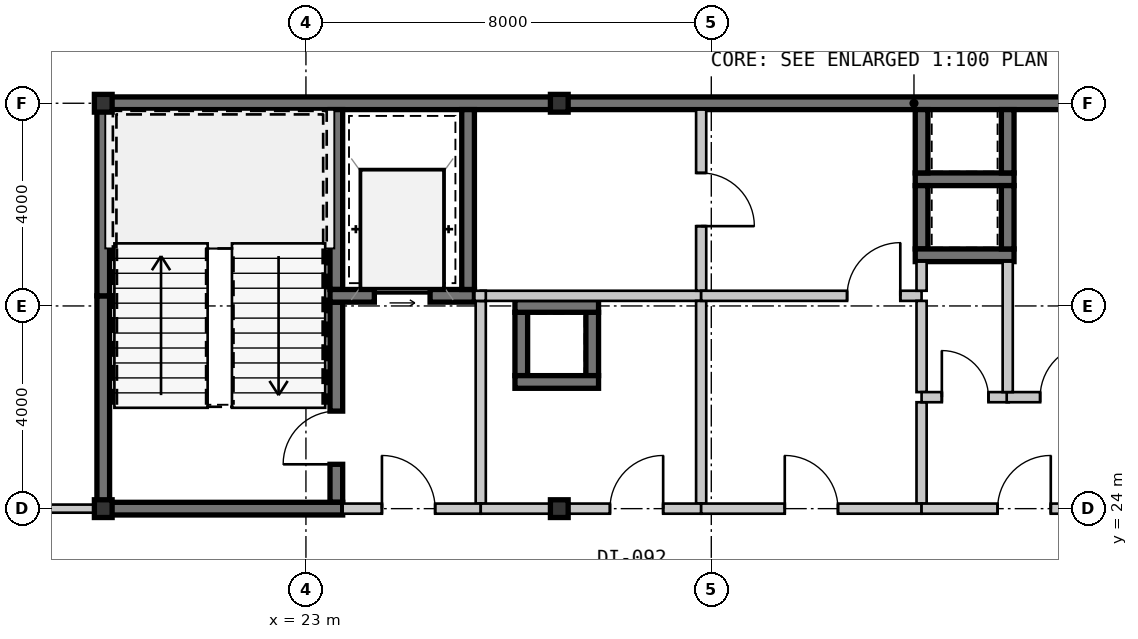
"""IFC4 building model, lengths in metres.
Left out: names, types, materials, properties, quantities, classifications, styles, units other than length and angle.
Written with IfcOpenShell. Run it as: python <this file> out.ifc"""

import sys

from ifc_helpers import new_model, si_unit, direction, frame, frame_2d, origin, origin_2d, place, context, subcontext, project, spatial, rectangle, hollow_rectangle, extrude, source, transform, mapped, element, fill, save


model = new_model("IFC4")
c1 = context("Model", 3, precision=1e-05, world=origin(), true_north=direction((0.0, 1.0)))
c2 = subcontext(c1, "Body", "Model", "MODEL_VIEW")
j1 = project(units=[si_unit("LENGTHUNIT", "METRE"), si_unit("PLANEANGLEUNIT", "RADIAN")], contexts=[c1])
p1 = place(None, origin())
s1 = spatial("IfcSite", under=j1, at=p1, CompositionType="ELEMENT")
p2 = place(p1, origin())
s2 = spatial("IfcBuilding", under=s1, at=p2, CompositionType="ELEMENT")
p3 = place(p2, frame((0.0, 0.0, 197.75)))
s3 = spatial("IfcBuildingStorey", under=s2, at=p3, CompositionType="ELEMENT", Elevation=197.75)
m1 = source(origin(), c2, "Body", "SweptSolid", [
    extrude(hollow_rectangle(XDim=0.35, YDim=0.35, WallThickness=0.016, at=origin_2d()), origin(), (0.0, 0.0, 1.0), 3.15),
])
for number, where, z_axis, x_axis in (
    (1, (19.0, 24.0, 0.0), (0.0, 0.0, 1.0), (1.0, 0.0, 0.0)),
    (2, (28.0, 24.0, 0.0), (0.0, 0.0, 1.0), (1.0, 0.0, 0.0)),
    (3, (19.0, 32.0, 0.0), (0.0, 0.0, 1.0), (1.0, 0.0, 0.0)),
    (4, (28.0, 32.0, 0.0), (0.0, 0.0, 1.0), (1.0, 0.0, 0.0)),
):
    element("IfcColumn", number, at=place(p3, frame(where, z_axis=z_axis, x_axis=x_axis)), inside=s3, PredefinedType="COLUMN", context=c2, shape_type="MappedRepresentation", body=[
        mapped(m1, transform((0.0, 0.0, 0.0), scale=1.0)),
    ])
m2 = source(origin(), c2, "Body", "SweptSolid", [
    extrude(rectangle(XDim=9.125, YDim=0.25, at=frame_2d((4.562, 0.0))), origin(), (0.0, 0.0, 1.0), 2.93),
])
p4 = place(p3, frame((18.875, 32.0, 0.0), z_axis=(0.0, 0.0, 1.0), x_axis=(1.0, 0.0, 0.0)))
e5 = element("IfcWall", 5, at=p4, inside=s3, PredefinedType="SHEAR", context=c2, shape_type="MappedRepresentation", body=[
    mapped(m2, transform((0.0, 0.0, 0.0), scale=1.0)),
])
m3 = source(origin(), c2, "Body", "SweptSolid", [
    extrude(rectangle(XDim=11.2, YDim=0.25, at=frame_2d((5.6, 0.0))), origin(), (0.0, 0.0, 1.0), 2.93),
])
p5 = place(p3, frame((28.0, 32.0, 0.0), z_axis=(0.0, 0.0, 1.0), x_axis=(1.0, 0.0, 0.0)))
e6 = element("IfcWall", 6, at=p5, inside=s3, PredefinedType="SHEAR", context=c2, shape_type="MappedRepresentation", body=[
    mapped(m3, transform((0.0, 0.0, 0.0), scale=1.0)),
])
m4 = source(origin(), c2, "Body", "SweptSolid", [
    extrude(rectangle(XDim=4.075, YDim=0.25, at=frame_2d((2.038, 0.0))), origin(), (0.0, 0.0, 1.0), 2.93),
])
p6 = place(p3, frame((19.0, 24.125, 0.0), z_axis=(0.0, 0.0, 1.0), x_axis=(0.0, 1.0, 0.0)))
e7 = element("IfcWall", 7, at=p6, inside=s3, PredefinedType="SHEAR", context=c2, shape_type="MappedRepresentation", body=[
    mapped(m4, transform((0.0, 0.0, 0.0), scale=1.0)),
])
m5 = source(origin(), c2, "Body", "SweptSolid", [
    extrude(rectangle(XDim=3.675, YDim=0.25, at=frame_2d((1.837, 0.0))), origin(), (0.0, 0.0, 1.0), 2.93),
])
p7 = place(p3, frame((19.0, 28.2, 0.0), z_axis=(0.0, 0.0, 1.0), x_axis=(0.0, 1.0, 0.0)))
e8 = element("IfcWall", 8, at=p7, inside=s3, PredefinedType="SHEAR", context=c2, shape_type="MappedRepresentation", body=[
    mapped(m5, transform((0.0, 0.0, 0.0), scale=1.0)),
])
m6 = source(origin(), c2, "Body", "SweptSolid", [
    extrude(rectangle(XDim=3.55, YDim=0.25, at=frame_2d((1.775, 0.0))), origin(), (0.0, 0.0, 1.0), 2.93),
])
p8 = place(p3, frame((23.6, 28.325, 0.0), z_axis=(0.0, 0.0, 1.0), x_axis=(0.0, 1.0, 0.0)))
e9 = element("IfcWall", 9, at=p8, inside=s3, PredefinedType="SHEAR", context=c2, shape_type="MappedRepresentation", body=[
    mapped(m6, transform((0.0, 0.0, 0.0), scale=1.0)),
])
m7 = source(origin(), c2, "Body", "SweptSolid", [
    extrude(rectangle(XDim=3.95, YDim=0.25, at=frame_2d((1.975, 0.0))), origin(), (0.0, 0.0, 1.0), 2.93),
])
p9 = place(p3, frame((23.6, 24.125, 0.0), z_axis=(0.0, 0.0, 1.0), x_axis=(0.0, 1.0, 0.0)))
e10 = element("IfcWall", 10, at=p9, inside=s3, PredefinedType="SHEAR", context=c2, shape_type="MappedRepresentation", body=[
    mapped(m7, transform((0.0, 0.0, 0.0), scale=1.0)),
])
m8 = source(origin(), c2, "Body", "SweptSolid", [
    extrude(rectangle(XDim=1.05, YDim=2.1, at=frame_2d((0.525, 1.05))), frame((0.0, 0.135, 0.0), z_axis=(0.0, -1.0, 0.0), x_axis=(1.0, 0.0, 0.0)), (0.0, 0.0, 1.0), 0.27),
])
p10 = place(p9, frame((0.75, 0.0, 0.0)))
e11 = element("IfcOpeningElement", 11, at=p10, cuts=e10, PredefinedType="OPENING", context=c2, shape_type="MappedRepresentation", body=[
    mapped(m8, transform((0.0, 0.0, 0.0), scale=1.0)),
])
m9 = source(origin(), c2, "Body", "SweptSolid", [
    extrude(rectangle(XDim=4.85, YDim=0.25, at=frame_2d((2.425, 0.0))), origin(), (0.0, 0.0, 1.0), 2.93),
])
p11 = place(p3, frame((18.875, 24.0, 0.0), z_axis=(0.0, 0.0, 1.0), x_axis=(1.0, 0.0, 0.0)))
e12 = element("IfcWall", 12, at=p11, inside=s3, PredefinedType="SHEAR", context=c2, shape_type="MappedRepresentation", body=[
    mapped(m9, transform((0.0, 0.0, 0.0), scale=1.0)),
])
m10 = source(origin(), c2, "Body", "SweptSolid", [
    extrude(rectangle(XDim=2.85, YDim=0.25, at=frame_2d((1.425, 0.0))), origin(), (0.0, 0.0, 1.0), 2.93),
])
p12 = place(p3, frame((23.475, 28.2, 0.0), z_axis=(0.0, 0.0, 1.0), x_axis=(1.0, 0.0, 0.0)))
e13 = element("IfcWall", 13, at=p12, inside=s3, PredefinedType="SHEAR", context=c2, shape_type="MappedRepresentation", body=[
    mapped(m10, transform((0.0, 0.0, 0.0), scale=1.0)),
])
m11 = source(origin(), c2, "Body", "SweptSolid", [
    extrude(rectangle(XDim=1.1, YDim=2.15, at=frame_2d((0.55, 1.075))), frame((0.0, 0.135, 0.0), z_axis=(0.0, -1.0, 0.0), x_axis=(1.0, 0.0, 0.0)), (0.0, 0.0, 1.0), 0.27),
])
p13 = place(p12, frame((0.875, 0.0, 0.0)))
e14 = element("IfcOpeningElement", 14, at=p13, cuts=e13, PredefinedType="OPENING", context=c2, shape_type="MappedRepresentation", body=[
    mapped(m11, transform((0.0, 0.0, 0.0), scale=1.0)),
])
p14 = place(p3, frame((26.2, 28.325, 0.0), z_axis=(0.0, 0.0, 1.0), x_axis=(0.0, 1.0, 0.0)))
e15 = element("IfcWall", 15, at=p14, inside=s3, PredefinedType="SHEAR", context=c2, shape_type="MappedRepresentation", body=[
    mapped(m6, transform((0.0, 0.0, 0.0), scale=1.0)),
])
m12 = source(origin(), c2, "Body", "SweptSolid", [
    extrude(rectangle(XDim=4.0, YDim=0.2, at=frame_2d((2.0, 0.0))), origin(), (0.0, 0.0, 1.0), 2.93),
])
p15 = place(p3, frame((26.45, 24.1, 0.0), z_axis=(0.0, 0.0, 1.0), x_axis=(0.0, 1.0, 0.0)))
e16 = element("IfcWall", 16, at=p15, inside=s3, PredefinedType="SOLIDWALL", context=c2, shape_type="MappedRepresentation", body=[
    mapped(m12, transform((0.0, 0.0, 0.0), scale=1.0)),
])
m13 = source(origin(), c2, "Body", "SweptSolid", [
    extrude(rectangle(XDim=2.725, YDim=0.2, at=frame_2d((1.362, 0.0))), origin(), (0.0, 0.0, 1.0), 2.47),
])
p16 = place(p3, frame((23.725, 24.0, 0.0), z_axis=(0.0, 0.0, 1.0), x_axis=(1.0, 0.0, 0.0)))
e17 = element("IfcWall", 17, at=p16, inside=s3, PredefinedType="SOLIDWALL", context=c2, shape_type="MappedRepresentation", body=[
    mapped(m13, transform((0.0, 0.0, 0.0), scale=1.0)),
])
m14 = source(origin(), c2, "Body", "SweptSolid", [
    extrude(rectangle(XDim=1.05, YDim=2.1, at=frame_2d((0.525, 1.05))), frame((0.0, 0.11, 0.0), z_axis=(0.0, -1.0, 0.0), x_axis=(1.0, 0.0, 0.0)), (0.0, 0.0, 1.0), 0.22),
])
p17 = place(p16, frame((0.775, 0.0, 0.0)))
e18 = element("IfcOpeningElement", 18, at=p17, cuts=e17, PredefinedType="OPENING", context=c2, shape_type="MappedRepresentation", body=[
    mapped(m14, transform((0.0, 0.0, 0.0), scale=1.0)),
])
m15 = source(origin(), c2, "Body", "SweptSolid", [
    extrude(rectangle(XDim=1.95, YDim=0.25, at=frame_2d((0.975, 0.0))), origin(), (0.0, 0.0, 1.0), 2.93),
])
p18 = place(p3, frame((35.025, 30.5, 0.0), z_axis=(0.0, 0.0, 1.0), x_axis=(1.0, 0.0, 0.0)))
e19 = element("IfcWall", 19, at=p18, inside=s3, PredefinedType="SHEAR", context=c2, shape_type="MappedRepresentation", body=[
    mapped(m15, transform((0.0, 0.0, 0.0), scale=1.0)),
])
m16 = source(origin(), c2, "Body", "SweptSolid", [
    extrude(rectangle(XDim=1.25, YDim=0.25, at=frame_2d((0.625, 0.0))), origin(), (0.0, 0.0, 1.0), 2.93),
])
for number, where, z_axis, x_axis in (
    (20, (35.15, 31.875, 0.0), (0.0, 0.0, 1.0), (0.0, -1.0, 0.0)),
    (21, (36.85, 30.625, 0.0), (0.0, 0.0, 1.0), (0.0, 1.0, 0.0)),
    (22, (35.15, 30.375, 0.0), (0.0, 0.0, 1.0), (0.0, -1.0, 0.0)),
):
    element("IfcWall", number, at=place(p3, frame(where, z_axis=z_axis, x_axis=x_axis)), inside=s3, PredefinedType="SHEAR", context=c2, shape_type="MappedRepresentation", body=[
        mapped(m16, transform((0.0, 0.0, 0.0), scale=1.0)),
    ])
p19 = place(p3, frame((35.025, 29.0, 0.0), z_axis=(0.0, 0.0, 1.0), x_axis=(1.0, 0.0, 0.0)))
e23 = element("IfcWall", 23, at=p19, inside=s3, PredefinedType="SHEAR", context=c2, shape_type="MappedRepresentation", body=[
    mapped(m15, transform((0.0, 0.0, 0.0), scale=1.0)),
])
for number, where, z_axis, x_axis in (
    (24, (36.85, 29.125, 0.0), (0.0, 0.0, 1.0), (0.0, 1.0, 0.0)),
    (25, (28.65, 26.625, 0.0), (0.0, 0.0, 1.0), (0.0, 1.0, 0.0)),
    (26, (27.25, 27.875, 0.0), (0.0, 0.0, 1.0), (0.0, -1.0, 0.0)),
):
    element("IfcWall", number, at=place(p3, frame(where, z_axis=z_axis, x_axis=x_axis)), inside=s3, PredefinedType="SHEAR", context=c2, shape_type="MappedRepresentation", body=[
        mapped(m16, transform((0.0, 0.0, 0.0), scale=1.0)),
    ])
m17 = source(origin(), c2, "Body", "SweptSolid", [
    extrude(rectangle(XDim=1.65, YDim=0.25, at=frame_2d((0.825, 0.0))), origin(), (0.0, 0.0, 1.0), 2.93),
])
for number, where, z_axis, x_axis in (
    (27, (28.775, 28.0, 0.0), (0.0, 0.0, 1.0), (-1.0, 0.0, 0.0)),
    (28, (27.125, 26.5, 0.0), (0.0, 0.0, 1.0), (1.0, 0.0, 0.0)),
):
    element("IfcWall", number, at=place(p3, frame(where, z_axis=z_axis, x_axis=x_axis)), inside=s3, PredefinedType="SHEAR", context=c2, shape_type="MappedRepresentation", body=[
        mapped(m17, transform((0.0, 0.0, 0.0), scale=1.0)),
    ])
m18 = source(origin(), c2, "Body", "SweptSolid", [
    extrude(rectangle(XDim=4.35, YDim=0.2, at=frame_2d((2.175, 0.0))), origin(), (0.0, 0.0, 1.0), 2.93),
])
p20 = place(p3, frame((26.45, 28.2, 0.0), z_axis=(0.0, 0.0, 1.0), x_axis=(1.0, 0.0, 0.0)))
e29 = element("IfcWall", 29, at=p20, inside=s3, PredefinedType="SOLIDWALL", context=c2, shape_type="MappedRepresentation", body=[
    mapped(m18, transform((0.0, 0.0, 0.0), scale=1.0)),
])
p21 = place(p3, frame((30.8, 28.1, 0.0), z_axis=(0.0, 0.0, 1.0), x_axis=(0.0, -1.0, 0.0)))
e30 = element("IfcWall", 30, at=p21, inside=s3, PredefinedType="SOLIDWALL", context=c2, shape_type="MappedRepresentation", body=[
    mapped(m12, transform((0.0, 0.0, 0.0), scale=1.0)),
])
m19 = source(origin(), c2, "Body", "SweptSolid", [
    extrude(rectangle(XDim=4.35, YDim=0.2, at=frame_2d((2.175, 0.0))), origin(), (0.0, 0.0, 1.0), 2.47),
])
p22 = place(p3, frame((30.8, 24.0, 0.0), z_axis=(0.0, 0.0, 1.0), x_axis=(-1.0, 0.0, 0.0)))
e31 = element("IfcWall", 31, at=p22, inside=s3, PredefinedType="SOLIDWALL", context=c2, shape_type="MappedRepresentation", body=[
    mapped(m19, transform((0.0, 0.0, 0.0), scale=1.0)),
])
p23 = place(p22, frame((0.75, 0.0, 0.0)))
e32 = element("IfcOpeningElement", 32, at=p23, cuts=e31, PredefinedType="OPENING", context=c2, shape_type="MappedRepresentation", body=[
    mapped(m14, transform((0.0, 0.0, 0.0), scale=1.0)),
])
m20 = source(origin(), c2, "Body", "SweptSolid", [
    extrude(rectangle(XDim=3.575, YDim=0.2, at=frame_2d((1.788, 0.0))), origin(), (0.0, 0.0, 1.0), 2.93),
])
p24 = place(p3, frame((30.8, 31.875, 0.0), z_axis=(0.0, 0.0, 1.0), x_axis=(0.0, -1.0, 0.0)))
e33 = element("IfcWall", 33, at=p24, inside=s3, PredefinedType="SOLIDWALL", context=c2, shape_type="MappedRepresentation", body=[
    mapped(m20, transform((0.0, 0.0, 0.0), scale=1.0)),
])
p25 = place(p24, frame((1.25, 0.0, 0.0)))
e34 = element("IfcOpeningElement", 34, at=p25, cuts=e33, PredefinedType="OPENING", context=c2, shape_type="MappedRepresentation", body=[
    mapped(m14, transform((0.0, 0.0, 0.0), scale=1.0)),
])
m21 = source(origin(), c2, "Body", "SweptSolid", [
    extrude(rectangle(XDim=4.35, YDim=0.2, at=frame_2d((2.175, 0.0))), origin(), (0.0, 0.0, 1.0), 2.93),
])
p26 = place(p3, frame((30.8, 28.2, 0.0), z_axis=(0.0, 0.0, 1.0), x_axis=(1.0, 0.0, 0.0)))
e35 = element("IfcWall", 35, at=p26, inside=s3, PredefinedType="SOLIDWALL", context=c2, shape_type="MappedRepresentation", body=[
    mapped(m21, transform((0.0, 0.0, 0.0), scale=1.0)),
])
p27 = place(p26, frame((2.88, 0.0, 0.0)))
e36 = element("IfcOpeningElement", 36, at=p27, cuts=e35, PredefinedType="OPENING", context=c2, shape_type="MappedRepresentation", body=[
    mapped(m14, transform((0.0, 0.0, 0.0), scale=1.0)),
])
m22 = source(origin(), c2, "Body", "SweptSolid", [
    extrude(rectangle(XDim=2.0, YDim=0.2, at=frame_2d((1.0, 0.0))), origin(), (0.0, 0.0, 1.0), 2.93),
])
p28 = place(p3, frame((35.15, 26.1, 0.0), z_axis=(0.0, 0.0, 1.0), x_axis=(0.0, -1.0, 0.0)))
e37 = element("IfcWall", 37, at=p28, inside=s3, PredefinedType="SOLIDWALL", context=c2, shape_type="MappedRepresentation", body=[
    mapped(m22, transform((0.0, 0.0, 0.0), scale=1.0)),
])
m23 = source(origin(), c2, "Body", "SweptSolid", [
    extrude(rectangle(XDim=1.8, YDim=0.2, at=frame_2d((0.9, 0.0))), origin(), (0.0, 0.0, 1.0), 2.93),
])
p29 = place(p3, frame((35.15, 28.1, 0.0), z_axis=(0.0, 0.0, 1.0), x_axis=(0.0, -1.0, 0.0)))
e38 = element("IfcWall", 38, at=p29, inside=s3, PredefinedType="SOLIDWALL", context=c2, shape_type="MappedRepresentation", body=[
    mapped(m23, transform((0.0, 0.0, 0.0), scale=1.0)),
])
m24 = source(origin(), c2, "Body", "SweptSolid", [
    extrude(rectangle(XDim=4.35, YDim=0.2, at=frame_2d((2.175, 0.0))), origin(), (0.0, 0.0, 1.0), 2.47),
])
p30 = place(p3, frame((35.15, 24.0, 0.0), z_axis=(0.0, 0.0, 1.0), x_axis=(-1.0, 0.0, 0.0)))
e39 = element("IfcWall", 39, at=p30, inside=s3, PredefinedType="SOLIDWALL", context=c2, shape_type="MappedRepresentation", body=[
    mapped(m24, transform((0.0, 0.0, 0.0), scale=1.0)),
])
p31 = place(p30, frame((1.65, 0.0, 0.0)))
e40 = element("IfcOpeningElement", 40, at=p31, cuts=e39, PredefinedType="OPENING", context=c2, shape_type="MappedRepresentation", body=[
    mapped(m14, transform((0.0, 0.0, 0.0), scale=1.0)),
])
m25 = source(origin(), c2, "Body", "SweptSolid", [
    extrude(rectangle(XDim=0.575, YDim=0.2, at=frame_2d((0.288, 0.0))), origin(), (0.0, 0.0, 1.0), 2.93),
])
p32 = place(p3, frame((35.15, 28.875, 0.0), z_axis=(0.0, 0.0, 1.0), x_axis=(0.0, -1.0, 0.0)))
e41 = element("IfcWall", 41, at=p32, inside=s3, PredefinedType="SOLIDWALL", context=c2, shape_type="MappedRepresentation", body=[
    mapped(m25, transform((0.0, 0.0, 0.0), scale=1.0)),
])
m26 = source(origin(), c2, "Body", "SweptSolid", [
    extrude(rectangle(XDim=1.72, YDim=0.2, at=frame_2d((0.86, 0.0))), origin(), (0.0, 0.0, 1.0), 2.93),
])
p33 = place(p3, frame((35.15, 26.2, 0.0), z_axis=(0.0, 0.0, 1.0), x_axis=(1.0, 0.0, 0.0)))
e42 = element("IfcWall", 42, at=p33, inside=s3, PredefinedType="SOLIDWALL", context=c2, shape_type="MappedRepresentation", body=[
    mapped(m26, transform((0.0, 0.0, 0.0), scale=1.0)),
])
m27 = source(origin(), c2, "Body", "SweptSolid", [
    extrude(rectangle(XDim=0.92, YDim=2.1, at=frame_2d((0.46, 1.05))), frame((0.0, 0.11, 0.0), z_axis=(0.0, -1.0, 0.0), x_axis=(1.0, 0.0, 0.0)), (0.0, 0.0, 1.0), 0.22),
])
p34 = place(p33, frame((0.4, 0.0, 0.0)))
e43 = element("IfcOpeningElement", 43, at=p34, cuts=e42, PredefinedType="OPENING", context=c2, shape_type="MappedRepresentation", body=[
    mapped(m27, transform((0.0, 0.0, 0.0), scale=1.0)),
])
m28 = source(origin(), c2, "Body", "SweptSolid", [
    extrude(rectangle(XDim=2.37, YDim=0.2, at=frame_2d((1.185, 0.0))), origin(), (0.0, 0.0, 1.0), 2.93),
])
p35 = place(p3, frame((36.83, 26.2, 0.0), z_axis=(0.0, 0.0, 1.0), x_axis=(1.0, 0.0, 0.0)))
e44 = element("IfcWall", 44, at=p35, inside=s3, PredefinedType="SOLIDWALL", context=c2, shape_type="MappedRepresentation", body=[
    mapped(m28, transform((0.0, 0.0, 0.0), scale=1.0)),
])
p36 = place(p35, frame((0.66, 0.0, 0.0)))
e45 = element("IfcOpeningElement", 45, at=p36, cuts=e44, PredefinedType="OPENING", context=c2, shape_type="MappedRepresentation", body=[
    mapped(m14, transform((0.0, 0.0, 0.0), scale=1.0)),
])
m29 = source(origin(), c2, "Body", "SweptSolid", [
    extrude(rectangle(XDim=4.05, YDim=0.2, at=frame_2d((2.025, 0.0))), origin(), (0.0, 0.0, 1.0), 2.47),
])
p37 = place(p3, frame((39.2, 24.0, 0.0), z_axis=(0.0, 0.0, 1.0), x_axis=(-1.0, 0.0, 0.0)))
e46 = element("IfcWall", 46, at=p37, inside=s3, PredefinedType="SOLIDWALL", context=c2, shape_type="MappedRepresentation", body=[
    mapped(m29, transform((0.0, 0.0, 0.0), scale=1.0)),
])
p38 = place(p37, frame((1.5, 0.0, 0.0)))
e47 = element("IfcOpeningElement", 47, at=p38, cuts=e46, PredefinedType="OPENING", context=c2, shape_type="MappedRepresentation", body=[
    mapped(m14, transform((0.0, 0.0, 0.0), scale=1.0)),
])
m30 = source(origin(), c2, "Body", "SweptSolid", [
    extrude(rectangle(XDim=2.575, YDim=0.2, at=frame_2d((1.288, 0.0))), origin(), (0.0, 0.0, 1.0), 2.93),
])
p39 = place(p3, frame((36.85, 28.875, 0.0), z_axis=(0.0, 0.0, 1.0), x_axis=(0.0, -1.0, 0.0)))
e48 = element("IfcWall", 48, at=p39, inside=s3, PredefinedType="SOLIDWALL", context=c2, shape_type="MappedRepresentation", body=[
    mapped(m30, transform((0.0, 0.0, 0.0), scale=1.0)),
])
m31 = source(origin(), c2, "Body", "SweptSolid", [
    extrude(rectangle(XDim=6.251, YDim=0.16, at=frame_2d((3.125, 0.0))), origin(), (0.0, 0.0, 1.0), 2.93),
])
p40 = place(p3, frame((12.624, 24.0, 0.0), z_axis=(0.0, 0.0, 1.0), x_axis=(1.0, 0.0, 0.0)))
e49 = element("IfcWall", 49, at=p40, inside=s3, PredefinedType="PARTITIONING", context=c2, shape_type="MappedRepresentation", body=[
    mapped(m31, transform((0.0, 0.0, 0.0), scale=1.0)),
])
m32 = source(origin(), c2, "Body", "SweptSolid", [
    extrude(rectangle(XDim=0.92, YDim=2.1, at=frame_2d((0.46, 1.05))), frame((0.0, 0.09, 0.0), z_axis=(0.0, -1.0, 0.0), x_axis=(1.0, 0.0, 0.0)), (0.0, 0.0, 1.0), 0.18),
])
p41 = place(p40, frame((2.718, 0.0, 0.0)))
e50 = element("IfcOpeningElement", 50, at=p41, cuts=e49, PredefinedType="OPENING", context=c2, shape_type="MappedRepresentation", body=[
    mapped(m32, transform((0.0, 0.0, 0.0), scale=1.0)),
])
m33 = source(origin(), c2, "Body", "SweptSolid", [
    extrude(rectangle(XDim=0.225, YDim=0.2, at=frame_2d((0.113, 0.0))), origin(), (0.0, 0.0, 1.0), 2.93),
])
p42 = place(p3, frame((26.325, 28.2, 0.0), z_axis=(0.0, 0.0, 1.0), x_axis=(1.0, 0.0, 0.0)))
e51 = element("IfcWall", 51, at=p42, inside=s3, PredefinedType="SOLIDWALL", context=c2, shape_type="MappedRepresentation", body=[
    mapped(m33, transform((0.0, 0.0, 0.0), scale=1.0)),
])
m34 = source(origin(), c2, "Body", "SweptSolid", [
    extrude(rectangle(XDim=1.05, YDim=2.1, at=frame_2d((0.525, 1.05))), frame((0.0, 0.025, 0.0), z_axis=(0.0, -1.0, 0.0), x_axis=(1.0, 0.0, 0.0)), (0.0, 0.0, 1.0), 0.05),
])
p43 = place(p10, origin())
e52 = element("IfcDoor", 52, at=p43, inside=s3, OperationType="SINGLE_SWING_LEFT", PredefinedType="DOOR", context=c2, shape_type="MappedRepresentation", body=[
    mapped(m34, transform((0.0, 0.0, 0.0), scale=1.0)),
])
fill(e11, e52)
m35 = source(origin(), c2, "Body", "SweptSolid", [
    extrude(rectangle(XDim=1.1, YDim=2.15, at=frame_2d((0.55, 1.075))), frame((0.0, 0.025, 0.0), z_axis=(0.0, -1.0, 0.0), x_axis=(1.0, 0.0, 0.0)), (0.0, 0.0, 1.0), 0.05),
])
p44 = place(p13, origin())
e53 = element("IfcDoor", 53, at=p44, inside=s3, OperationType="SLIDING_TO_LEFT", PredefinedType="DOOR", context=c2, shape_type="MappedRepresentation", body=[
    mapped(m35, transform((0.0, 0.0, 0.0), scale=1.0)),
])
fill(e14, e53)
p45 = place(p17, origin())
e54 = element("IfcDoor", 54, at=p45, inside=s3, OperationType="SINGLE_SWING_LEFT", PredefinedType="DOOR", context=c2, shape_type="MappedRepresentation", body=[
    mapped(m34, transform((0.0, 0.0, 0.0), scale=1.0)),
])
fill(e18, e54)
p46 = place(p23, frame((1.05, 0.0, 0.0), z_axis=(0.0, 0.0, 1.0), x_axis=(-1.0, 0.0, 0.0)))
e55 = element("IfcDoor", 55, at=p46, inside=s3, OperationType="SINGLE_SWING_RIGHT", PredefinedType="DOOR", context=c2, shape_type="MappedRepresentation", body=[
    mapped(m34, transform((0.0, 0.0, 0.0), scale=1.0)),
])
fill(e32, e55)
p47 = place(p25, origin())
e56 = element("IfcDoor", 56, at=p47, inside=s3, OperationType="SINGLE_SWING_RIGHT", PredefinedType="DOOR", context=c2, shape_type="MappedRepresentation", body=[
    mapped(m34, transform((0.0, 0.0, 0.0), scale=1.0)),
])
fill(e34, e56)
p48 = place(p27, origin())
e57 = element("IfcDoor", 57, at=p48, inside=s3, OperationType="SINGLE_SWING_RIGHT", PredefinedType="DOOR", context=c2, shape_type="MappedRepresentation", body=[
    mapped(m34, transform((0.0, 0.0, 0.0), scale=1.0)),
])
fill(e36, e57)
p49 = place(p31, frame((1.05, 0.0, 0.0), z_axis=(0.0, 0.0, 1.0), x_axis=(-1.0, 0.0, 0.0)))
e58 = element("IfcDoor", 58, at=p49, inside=s3, OperationType="SINGLE_SWING_LEFT", PredefinedType="DOOR", context=c2, shape_type="MappedRepresentation", body=[
    mapped(m34, transform((0.0, 0.0, 0.0), scale=1.0)),
])
fill(e40, e58)
m36 = source(origin(), c2, "Body", "SweptSolid", [
    extrude(rectangle(XDim=0.92, YDim=2.1, at=frame_2d((0.46, 1.05))), frame((0.0, 0.025, 0.0), z_axis=(0.0, -1.0, 0.0), x_axis=(1.0, 0.0, 0.0)), (0.0, 0.0, 1.0), 0.05),
])
p50 = place(p34, origin())
e59 = element("IfcDoor", 59, at=p50, inside=s3, OperationType="SINGLE_SWING_LEFT", PredefinedType="DOOR", context=c2, shape_type="MappedRepresentation", body=[
    mapped(m36, transform((0.0, 0.0, 0.0), scale=1.0)),
])
fill(e43, e59)
p51 = place(p36, origin())
e60 = element("IfcDoor", 60, at=p51, inside=s3, OperationType="SINGLE_SWING_RIGHT", PredefinedType="DOOR", context=c2, shape_type="MappedRepresentation", body=[
    mapped(m34, transform((0.0, 0.0, 0.0), scale=1.0)),
])
fill(e45, e60)
p52 = place(p38, frame((1.05, 0.0, 0.0), z_axis=(0.0, 0.0, 1.0), x_axis=(-1.0, 0.0, 0.0)))
e61 = element("IfcDoor", 61, at=p52, inside=s3, OperationType="SINGLE_SWING_RIGHT", PredefinedType="DOOR", context=c2, shape_type="MappedRepresentation", body=[
    mapped(m34, transform((0.0, 0.0, 0.0), scale=1.0)),
])
fill(e47, e61)
save(model, sys.argv[1])
